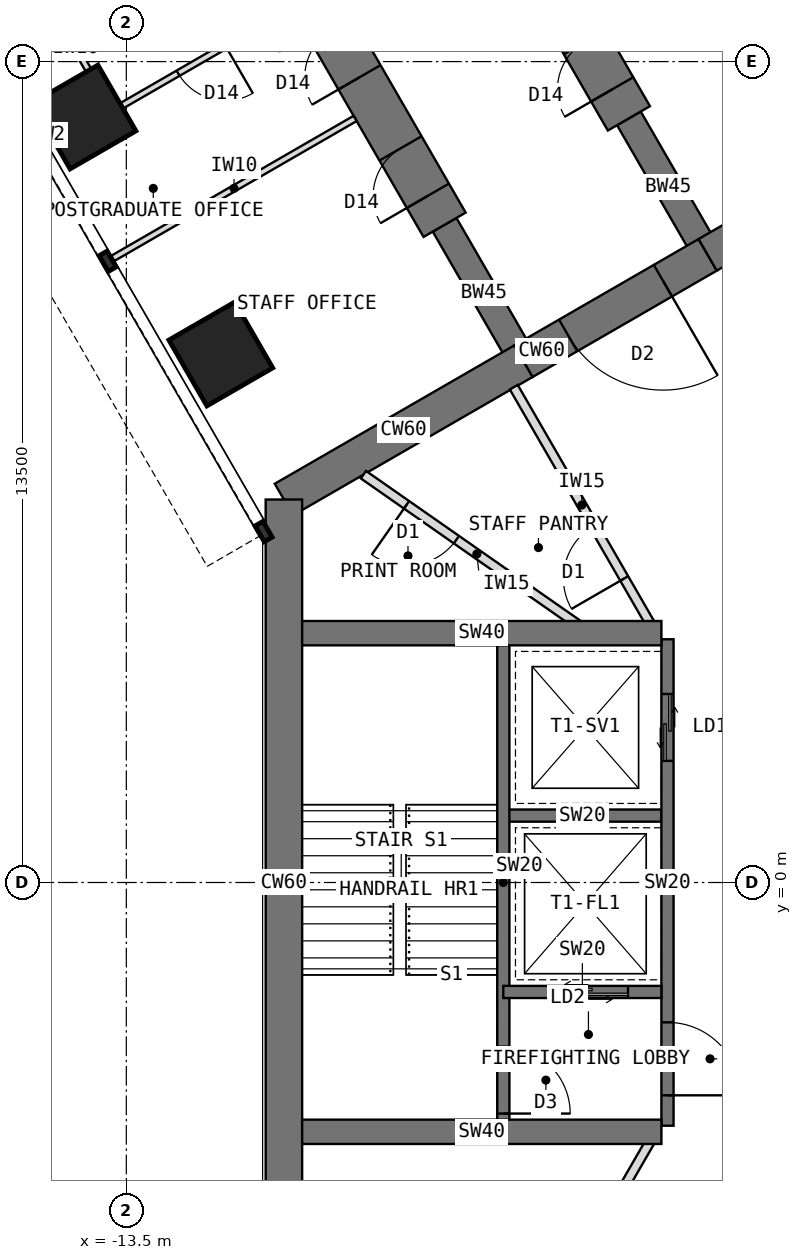
"""IFC4 building model, lengths in metres.
Left out: names, types, materials, properties, quantities, classifications, styles, units other than length and angle.
Written with IfcOpenShell. Run it as: python <this file> out.ifc"""

import sys

from ifc_helpers import new_model, si_unit, direction, frame, frame_2d, origin, origin_2d, place, context, subcontext, project, spatial, rectangle, extrude, element, fill, save


model = new_model("IFC4")
c1 = context("Model", 3, precision=1e-05, world=origin(), true_north=direction((0.0, 1.0)))
c2 = subcontext(c1, "Body", "Model", "MODEL_VIEW")
j1 = project(units=[si_unit("LENGTHUNIT", "METRE"), si_unit("PLANEANGLEUNIT", "RADIAN")], contexts=[c1])
p1 = place(None, origin())
s1 = spatial("IfcSite", under=j1, at=p1, CompositionType="ELEMENT")
p2 = place(p1, origin())
s2 = spatial("IfcBuilding", under=s1, at=p2, CompositionType="ELEMENT")
p3 = place(p2, frame((0.0, 0.0, 161.5)))
s3 = spatial("IfcBuildingStorey", under=s2, at=p3, CompositionType="ELEMENT", Elevation=161.5)
p4 = place(p3, frame((0.0, 12.596, 0.0), z_axis=(0.0, 0.0, 1.0), x_axis=(-0.866011268655, -0.500024481964, 0.0)))
e1 = element("IfcWall", 1, at=p4, inside=s3, PredefinedType="SHEAR", context=c2, shape_type="SweptSolid", body=[
    extrude(rectangle(XDim=4.548, YDim=0.6, at=frame_2d((2.274, 0.0))), origin(), (0.0, 0.0, 1.0), 4.0),
])
p5 = place(p3, frame((-3.939, 10.322, 0.0), z_axis=(0.0, 0.0, 1.0), x_axis=(-0.866019471182, -0.500010275428, 0.0)))
e2 = element("IfcWall", 2, at=p5, inside=s3, PredefinedType="SHEAR", context=c2, shape_type="SweptSolid", body=[
    extrude(rectangle(XDim=3.5, YDim=0.6, at=frame_2d((1.75, 0.0))), origin(), (0.0, 0.0, 1.0), 4.0),
])
p6 = place(p5, frame((0.85, 0.0, 0.0)))
e3 = element("IfcOpeningElement", 3, at=p6, cuts=e2, PredefinedType="OPENING", context=c2, shape_type="SweptSolid", body=[
    extrude(rectangle(XDim=1.8, YDim=2.1, at=frame_2d((0.9, 1.05))), frame((0.0, 0.31, 0.0), z_axis=(0.0, -1.0, 0.0), x_axis=(1.0, 0.0, 0.0)), (0.0, 0.0, 1.0), 0.62),
])
p7 = place(p3, frame((-6.97, 8.572, 0.0), z_axis=(0.0, 0.0, 1.0), x_axis=(-0.866034513004, -0.499984222037, 0.0)))
e4 = element("IfcWall", 4, at=p7, inside=s3, PredefinedType="SHEAR", context=c2, shape_type="SweptSolid", body=[
    extrude(rectangle(XDim=4.548, YDim=0.6, at=frame_2d((2.274, 0.0))), origin(), (0.0, 0.0, 1.0), 4.0),
])
p8 = place(p3, frame((-10.908, 6.298, 0.0), z_axis=(0.0, 0.0, 1.0), x_axis=(0.0, -1.0, 0.0)))
e5 = element("IfcWall", 5, at=p8, inside=s3, PredefinedType="SHEAR", context=c2, shape_type="SweptSolid", body=[
    extrude(rectangle(XDim=12.596, YDim=0.6, at=frame_2d((6.298, 0.0))), origin(), (0.0, 0.0, 1.0), 4.0),
])
p9 = place(p3, frame((-6.97, 8.572, 0.0), z_axis=(0.0, 0.0, 1.0), x_axis=(-0.499988811324, 0.866031863473, 0.0)))
e6 = element("IfcWall", 6, at=p9, inside=s3, PredefinedType="SHEAR", context=c2, shape_type="SweptSolid", body=[
    extrude(rectangle(XDim=2.592, YDim=0.45, at=frame_2d((1.296, 0.0))), origin(), (0.0, 0.0, 1.0), 4.0),
])
p10 = place(p3, frame((-8.266, 10.816, 0.0), z_axis=(0.0, 0.0, 1.0), x_axis=(-0.499996231654, 0.866027579429, 0.0)))
e7 = element("IfcWall", 7, at=p10, inside=s3, PredefinedType="SHEAR", context=c2, shape_type="SweptSolid", body=[
    extrude(rectangle(XDim=13.2, YDim=0.8, at=frame_2d((6.6, 0.0))), origin(), (0.0, 0.0, 1.0), 4.0),
])
p11 = place(p10, frame((0.55, 0.0, 0.0)))
e8 = element("IfcOpeningElement", 8, at=p11, cuts=e7, PredefinedType="OPENING", context=c2, shape_type="SweptSolid", body=[
    extrude(rectangle(XDim=0.9, YDim=2.1, at=frame_2d((0.45, 1.05))), frame((0.0, 0.41, 0.0), z_axis=(0.0, -1.0, 0.0), x_axis=(1.0, 0.0, 0.0)), (0.0, 0.0, 1.0), 0.82),
])
p12 = place(p10, frame((2.8, 0.0, 0.0)))
e9 = element("IfcOpeningElement", 9, at=p12, cuts=e7, PredefinedType="OPENING", context=c2, shape_type="SweptSolid", body=[
    extrude(rectangle(XDim=0.9, YDim=2.1, at=frame_2d((0.45, 1.05))), frame((0.0, 0.41, 0.0), z_axis=(0.0, -1.0, 0.0), x_axis=(1.0, 0.0, 0.0)), (0.0, 0.0, 1.0), 0.82),
])
p13 = place(p10, frame((7.3, 0.0, 0.0)))
e10 = element("IfcOpeningElement", 10, at=p13, cuts=e7, PredefinedType="OPENING", context=c2, shape_type="SweptSolid", body=[
    extrude(rectangle(XDim=0.9, YDim=2.1, at=frame_2d((0.45, 1.05))), frame((0.0, 0.41, 0.0), z_axis=(0.0, -1.0, 0.0), x_axis=(1.0, 0.0, 0.0)), (0.0, 0.0, 1.0), 0.82),
])
p14 = place(p3, frame((-3.939, 10.322, 0.0), z_axis=(0.0, 0.0, 1.0), x_axis=(-0.499918158782, 0.866072649678, 0.0)))
e11 = element("IfcWall", 11, at=p14, inside=s3, PredefinedType="SHEAR", context=c2, shape_type="SweptSolid", body=[
    extrude(rectangle(XDim=2.592, YDim=0.45, at=frame_2d((1.296, 0.0))), origin(), (0.0, 0.0, 1.0), 4.0),
])
p15 = place(p3, frame((-5.234, 12.566, 0.0), z_axis=(0.0, 0.0, 1.0), x_axis=(-0.500010103361, 0.866019570528, 0.0)))
e12 = element("IfcWall", 12, at=p15, inside=s3, PredefinedType="SHEAR", context=c2, shape_type="SweptSolid", body=[
    extrude(rectangle(XDim=13.2, YDim=0.8, at=frame_2d((6.6, 0.0))), origin(), (0.0, 0.0, 1.0), 4.0),
])
p16 = place(p15, frame((0.55, 0.0, 0.0)))
e13 = element("IfcOpeningElement", 13, at=p16, cuts=e12, PredefinedType="OPENING", context=c2, shape_type="SweptSolid", body=[
    extrude(rectangle(XDim=0.9, YDim=2.1, at=frame_2d((0.45, 1.05))), frame((0.0, 0.41, 0.0), z_axis=(0.0, -1.0, 0.0), x_axis=(1.0, 0.0, 0.0)), (0.0, 0.0, 1.0), 0.82),
])
p17 = place(p15, frame((2.8, 0.0, 0.0)))
e14 = element("IfcOpeningElement", 14, at=p17, cuts=e12, PredefinedType="OPENING", context=c2, shape_type="SweptSolid", body=[
    extrude(rectangle(XDim=0.9, YDim=2.1, at=frame_2d((0.45, 1.05))), frame((0.0, 0.41, 0.0), z_axis=(0.0, -1.0, 0.0), x_axis=(1.0, 0.0, 0.0)), (0.0, 0.0, 1.0), 0.82),
])
p18 = place(p15, frame((7.3, 0.0, 0.0)))
e15 = element("IfcOpeningElement", 15, at=p18, cuts=e12, PredefinedType="OPENING", context=c2, shape_type="SweptSolid", body=[
    extrude(rectangle(XDim=0.9, YDim=2.1, at=frame_2d((0.45, 1.05))), frame((0.0, 0.41, 0.0), z_axis=(0.0, -1.0, 0.0), x_axis=(1.0, 0.0, 0.0)), (0.0, 0.0, 1.0), 0.82),
])
for number, where, z_axis, x_axis in (
    (16, (-11.946, 8.691, 0.0), (0.0, 0.0, 1.0), (0.866, 0.5, 0.0)),
    (17, (-14.196, 12.588, 0.0), (0.0, 0.0, 1.0), (0.866, 0.5, 0.0)),
):
    element("IfcColumn", number, at=place(p3, frame(where, z_axis=z_axis, x_axis=x_axis)), inside=s3, PredefinedType="COLUMN", context=c2, shape_type="SweptSolid", body=[
        extrude(rectangle(XDim=1.25, YDim=1.25, at=origin_2d()), origin(), (0.0, 0.0, 1.0), 4.0),
    ])
p19 = place(p3, frame((-4.6, 4.0, 0.0), z_axis=(0.0, 0.0, 1.0), x_axis=(0.0, -1.0, 0.0)))
e18 = element("IfcWall", 18, at=p19, inside=s3, PredefinedType="SHEAR", context=c2, shape_type="SweptSolid", body=[
    extrude(rectangle(XDim=8.0, YDim=0.2, at=frame_2d((4.0, 0.0))), origin(), (0.0, 0.0, 1.0), 4.0),
])
p20 = place(p19, frame((6.3, 0.0, 0.0)))
e19 = element("IfcOpeningElement", 19, at=p20, cuts=e18, PredefinedType="OPENING", context=c2, shape_type="SweptSolid", body=[
    extrude(rectangle(XDim=1.2, YDim=2.1, at=frame_2d((0.6, 1.05))), frame((0.0, 0.11, 0.0), z_axis=(0.0, -1.0, 0.0), x_axis=(1.0, 0.0, 0.0)), (0.0, 0.0, 1.0), 0.22),
])
p21 = place(p19, frame((0.9, 0.0, 0.0)))
e20 = element("IfcOpeningElement", 20, at=p21, cuts=e18, PredefinedType="OPENING", context=c2, shape_type="SweptSolid", body=[
    extrude(rectangle(XDim=1.1, YDim=2.2, at=frame_2d((0.55, 1.1))), frame((0.0, 0.11, 0.0), z_axis=(0.0, -1.0, 0.0), x_axis=(1.0, 0.0, 0.0)), (0.0, 0.0, 1.0), 0.22),
])
p22 = place(p3, frame((-4.7, 1.1, 0.0), z_axis=(0.0, 0.0, 1.0), x_axis=(-1.0, 0.0, 0.0)))
e21 = element("IfcWall", 21, at=p22, inside=s3, PredefinedType="SHEAR", context=c2, shape_type="SweptSolid", body=[
    extrude(rectangle(XDim=2.6, YDim=0.2, at=frame_2d((1.3, 0.0))), origin(), (0.0, 0.0, 1.0), 4.0),
])
p23 = place(p3, frame((-4.7, -1.8, 0.0), z_axis=(0.0, 0.0, 1.0), x_axis=(-1.0, 0.0, 0.0)))
e22 = element("IfcWall", 22, at=p23, inside=s3, PredefinedType="SHEAR", context=c2, shape_type="SweptSolid", body=[
    extrude(rectangle(XDim=2.6, YDim=0.2, at=frame_2d((1.3, 0.0))), origin(), (0.0, 0.0, 1.0), 4.0),
])
p24 = place(p23, frame((0.55, 0.0, 0.0)))
e23 = element("IfcOpeningElement", 23, at=p24, cuts=e22, PredefinedType="OPENING", context=c2, shape_type="SweptSolid", body=[
    extrude(rectangle(XDim=1.3, YDim=2.2, at=frame_2d((0.65, 1.1))), frame((0.0, 0.11, 0.0), z_axis=(0.0, -1.0, 0.0), x_axis=(1.0, 0.0, 0.0)), (0.0, 0.0, 1.0), 0.22),
])
p25 = place(p3, frame((-7.3, 4.0, 0.0), z_axis=(0.0, 0.0, 1.0), x_axis=(0.0, -1.0, 0.0)))
e24 = element("IfcWall", 24, at=p25, inside=s3, PredefinedType="SHEAR", context=c2, shape_type="SweptSolid", body=[
    extrude(rectangle(XDim=8.0, YDim=0.2, at=frame_2d((4.0, 0.0))), origin(), (0.0, 0.0, 1.0), 4.0),
])
p26 = place(p25, frame((6.7, 0.0, 0.0)))
e25 = element("IfcOpeningElement", 25, at=p26, cuts=e24, PredefinedType="OPENING", context=c2, shape_type="SweptSolid", body=[
    extrude(rectangle(XDim=1.1, YDim=2.1, at=frame_2d((0.55, 1.05))), frame((0.0, 0.11, 0.0), z_axis=(0.0, -1.0, 0.0), x_axis=(1.0, 0.0, 0.0)), (0.0, 0.0, 1.0), 0.22),
])
for number, where, z_axis, x_axis in (
    (26, (-4.7, -4.1, 0.0), (0.0, 0.0, 1.0), (-1.0, 0.0, 0.0)),
    (27, (-4.7, 4.1, 0.0), (0.0, 0.0, 1.0), (-1.0, 0.0, 0.0)),
):
    element("IfcWall", number, at=place(p3, frame(where, z_axis=z_axis, x_axis=x_axis)), inside=s3, PredefinedType="SHEAR", context=c2, shape_type="SweptSolid", body=[
        extrude(rectangle(XDim=5.908, YDim=0.4, at=frame_2d((2.954, 0.0))), origin(), (0.0, 0.0, 1.0), 4.0),
    ])
p27 = place(p3, frame((-9.737, 12.565, 0.0), z_axis=(0.0, 0.0, 1.0), x_axis=(-0.866016770315, -0.500014953309, 0.0)))
e28 = element("IfcWall", 28, at=p27, inside=s3, PredefinedType="PARTITIONING", context=c2, shape_type="SweptSolid", body=[
    extrude(rectangle(XDim=4.6, YDim=0.1, at=frame_2d((2.3, 0.0))), origin(), (0.0, 0.0, 1.0), 3.7),
])
p28 = place(p3, frame((-13.731, 12.684, 0.0), z_axis=(0.0, 0.0, 1.0), x_axis=(-0.500001309137, 0.866024647952, 0.0)))
e29 = element("IfcWall", 29, at=p28, inside=s3, PredefinedType="PARTITIONING", context=c2, shape_type="SweptSolid", body=[
    extrude(rectangle(XDim=2.4, YDim=0.1, at=frame_2d((1.2, 0.0))), origin(), (0.0, 0.0, 1.0), 3.7),
])
p29 = place(p3, frame((-10.787, 14.384, 0.0), z_axis=(0.0, 0.0, 1.0), x_axis=(-0.866038511948, -0.499977295307, 0.0)))
e30 = element("IfcWall", 30, at=p29, inside=s3, PredefinedType="PARTITIONING", context=c2, shape_type="SweptSolid", body=[
    extrude(rectangle(XDim=3.4, YDim=0.1, at=frame_2d((1.7, 0.0))), origin(), (0.0, 0.0, 1.0), 3.7),
])
p30 = place(p29, frame((1.25, 0.0, 0.0)))
e31 = element("IfcOpeningElement", 31, at=p30, cuts=e30, PredefinedType="OPENING", context=c2, shape_type="SweptSolid", body=[
    extrude(rectangle(XDim=0.9, YDim=2.1, at=frame_2d((0.45, 1.05))), frame((0.0, 0.06, 0.0), z_axis=(0.0, -1.0, 0.0), x_axis=(1.0, 0.0, 0.0)), (0.0, 0.0, 1.0), 0.12),
])
p31 = place(p3, frame((-7.128, -8.146, 0.0), z_axis=(0.0, 0.0, 1.0), x_axis=(0.499999473313, 0.866025707867, 0.0)))
e32 = element("IfcWall", 32, at=p31, inside=s3, PredefinedType="PARTITIONING", context=c2, shape_type="SweptSolid", body=[
    extrude(rectangle(XDim=4.476, YDim=0.15, at=frame_2d((2.238, 0.0))), origin(), (0.0, 0.0, 1.0), 3.7),
])
p32 = place(p31, frame((0.843, 0.0, 0.0)))
e33 = element("IfcOpeningElement", 33, at=p32, cuts=e32, PredefinedType="OPENING", context=c2, shape_type="SweptSolid", body=[
    extrude(rectangle(XDim=1.0, YDim=2.1, at=frame_2d((0.5, 1.05))), frame((0.0, 0.085, 0.0), z_axis=(0.0, -1.0, 0.0), x_axis=(1.0, 0.0, 0.0)), (0.0, 0.0, 1.0), 0.17),
])
p33 = place(p3, frame((-4.89, 4.27, 0.0), z_axis=(0.0, 0.0, 1.0), x_axis=(-0.499999473313, 0.866025707867, 0.0)))
e34 = element("IfcWall", 34, at=p33, inside=s3, PredefinedType="PARTITIONING", context=c2, shape_type="SweptSolid", body=[
    extrude(rectangle(XDim=4.476, YDim=0.15, at=frame_2d((2.238, 0.0))), origin(), (0.0, 0.0, 1.0), 3.7),
])
p34 = place(p33, frame((0.843, 0.0, 0.0)))
e35 = element("IfcOpeningElement", 35, at=p34, cuts=e34, PredefinedType="OPENING", context=c2, shape_type="SweptSolid", body=[
    extrude(rectangle(XDim=1.0, YDim=2.1, at=frame_2d((0.5, 1.05))), frame((0.0, 0.085, 0.0), z_axis=(0.0, -1.0, 0.0), x_axis=(1.0, 0.0, 0.0)), (0.0, 0.0, 1.0), 0.17),
])
p35 = place(p3, frame((-5.869, 4.1, 0.0), z_axis=(0.0, 0.0, 1.0), x_axis=(-0.819788459852, 0.572666465836, 0.0)))
e36 = element("IfcWall", 36, at=p35, inside=s3, PredefinedType="PARTITIONING", context=c2, shape_type="SweptSolid", body=[
    extrude(rectangle(XDim=4.552, YDim=0.15, at=frame_2d((2.276, 0.0))), origin(), (0.0, 0.0, 1.0), 3.7),
])
p36 = place(p35, frame((2.686, 0.0, 0.0)))
e37 = element("IfcOpeningElement", 37, at=p36, cuts=e36, PredefinedType="OPENING", context=c2, shape_type="SweptSolid", body=[
    extrude(rectangle(XDim=1.0, YDim=2.1, at=frame_2d((0.5, 1.05))), frame((0.0, 0.085, 0.0), z_axis=(0.0, -1.0, 0.0), x_axis=(1.0, 0.0, 0.0)), (0.0, 0.0, 1.0), 0.17),
])
p37 = place(p20, origin())
e38 = element("IfcDoor", 38, at=p37, inside=s3, OperationType="SINGLE_SWING_RIGHT", PredefinedType="DOOR", context=c2, shape_type="SweptSolid", body=[
    extrude(rectangle(XDim=1.2, YDim=2.1, at=frame_2d((0.6, 1.05))), frame((0.0, 0.025, 0.0), z_axis=(0.0, -1.0, 0.0), x_axis=(1.0, 0.0, 0.0)), (0.0, 0.0, 1.0), 0.05),
])
fill(e19, e38)
p38 = place(p24, origin())
e39 = element("IfcDoor", 39, at=p38, inside=s3, OperationType="DOUBLE_DOOR_SLIDING", PredefinedType="DOOR", context=c2, shape_type="SweptSolid", body=[
    extrude(rectangle(XDim=1.3, YDim=2.2, at=frame_2d((0.65, 1.1))), frame((0.0, 0.025, 0.0), z_axis=(0.0, -1.0, 0.0), x_axis=(1.0, 0.0, 0.0)), (0.0, 0.0, 1.0), 0.05),
])
fill(e23, e39)
p39 = place(p21, origin())
e40 = element("IfcDoor", 40, at=p39, inside=s3, OperationType="DOUBLE_DOOR_SLIDING", PredefinedType="DOOR", context=c2, shape_type="SweptSolid", body=[
    extrude(rectangle(XDim=1.1, YDim=2.2, at=frame_2d((0.55, 1.1))), frame((0.0, 0.025, 0.0), z_axis=(0.0, -1.0, 0.0), x_axis=(1.0, 0.0, 0.0)), (0.0, 0.0, 1.0), 0.05),
])
fill(e20, e40)
p40 = place(p26, origin())
e41 = element("IfcDoor", 41, at=p40, inside=s3, OperationType="SINGLE_SWING_RIGHT", PredefinedType="DOOR", context=c2, shape_type="SweptSolid", body=[
    extrude(rectangle(XDim=1.1, YDim=2.1, at=frame_2d((0.55, 1.05))), frame((0.0, 0.025, 0.0), z_axis=(0.0, -1.0, 0.0), x_axis=(1.0, 0.0, 0.0)), (0.0, 0.0, 1.0), 0.05),
])
fill(e25, e41)
p41 = place(p6, origin())
e42 = element("IfcDoor", 42, at=p41, inside=s3, OperationType="DOUBLE_DOOR_DOUBLE_SWING", PredefinedType="DOOR", context=c2, shape_type="SweptSolid", body=[
    extrude(rectangle(XDim=1.72, YDim=2.06, at=frame_2d((0.9, 1.03))), frame((0.0, 0.025, 0.0), z_axis=(0.0, -1.0, 0.0), x_axis=(1.0, 0.0, 0.0)), (0.0, 0.0, 1.0), 0.05),
    extrude(rectangle(XDim=0.04, YDim=2.1, at=frame_2d((0.02, 1.05))), frame((0.0, 0.3, 0.0), z_axis=(0.0, -1.0, 0.0), x_axis=(1.0, 0.0, 0.0)), (0.0, 0.0, 1.0), 0.6),
    extrude(rectangle(XDim=0.04, YDim=2.1, at=frame_2d((1.78, 1.05))), frame((0.0, 0.3, 0.0), z_axis=(0.0, -1.0, 0.0), x_axis=(1.0, 0.0, 0.0)), (0.0, 0.0, 1.0), 0.6),
    extrude(rectangle(XDim=1.72, YDim=0.04, at=frame_2d((0.9, 2.08))), frame((0.0, 0.3, 0.0), z_axis=(0.0, -1.0, 0.0), x_axis=(1.0, 0.0, 0.0)), (0.0, 0.0, 1.0), 0.6),
])
fill(e3, e42)
p42 = place(p30, origin())
e43 = element("IfcDoor", 43, at=p42, inside=s3, OperationType="SINGLE_SWING_LEFT", PredefinedType="DOOR", context=c2, shape_type="SweptSolid", body=[
    extrude(rectangle(XDim=0.9, YDim=2.1, at=frame_2d((0.45, 1.05))), frame((0.0, 0.025, 0.0), z_axis=(0.0, -1.0, 0.0), x_axis=(1.0, 0.0, 0.0)), (0.0, 0.0, 1.0), 0.05),
])
fill(e31, e43)
p43 = place(p36, origin())
e44 = element("IfcDoor", 44, at=p43, inside=s3, OperationType="SINGLE_SWING_RIGHT", PredefinedType="DOOR", context=c2, shape_type="SweptSolid", body=[
    extrude(rectangle(XDim=1.0, YDim=2.1, at=frame_2d((0.5, 1.05))), frame((0.0, 0.025, 0.0), z_axis=(0.0, -1.0, 0.0), x_axis=(1.0, 0.0, 0.0)), (0.0, 0.0, 1.0), 0.05),
])
fill(e37, e44)
p44 = place(p34, origin())
e45 = element("IfcDoor", 45, at=p44, inside=s3, OperationType="SINGLE_SWING_LEFT", PredefinedType="DOOR", context=c2, shape_type="SweptSolid", body=[
    extrude(rectangle(XDim=1.0, YDim=2.1, at=frame_2d((0.5, 1.05))), frame((0.0, 0.025, 0.0), z_axis=(0.0, -1.0, 0.0), x_axis=(1.0, 0.0, 0.0)), (0.0, 0.0, 1.0), 0.05),
])
fill(e35, e45)
p45 = place(p11, origin())
e46 = element("IfcDoor", 46, at=p45, inside=s3, OperationType="SINGLE_SWING_LEFT", PredefinedType="DOOR", context=c2, shape_type="SweptSolid", body=[
    extrude(rectangle(XDim=0.82, YDim=2.06, at=frame_2d((0.45, 1.03))), frame((0.0, 0.025, 0.0), z_axis=(0.0, -1.0, 0.0), x_axis=(1.0, 0.0, 0.0)), (0.0, 0.0, 1.0), 0.05),
    extrude(rectangle(XDim=0.04, YDim=2.1, at=frame_2d((0.02, 1.05))), frame((0.0, 0.4, 0.0), z_axis=(0.0, -1.0, 0.0), x_axis=(1.0, 0.0, 0.0)), (0.0, 0.0, 1.0), 0.8),
    extrude(rectangle(XDim=0.04, YDim=2.1, at=frame_2d((0.88, 1.05))), frame((0.0, 0.4, 0.0), z_axis=(0.0, -1.0, 0.0), x_axis=(1.0, 0.0, 0.0)), (0.0, 0.0, 1.0), 0.8),
    extrude(rectangle(XDim=0.82, YDim=0.04, at=frame_2d((0.45, 2.08))), frame((0.0, 0.4, 0.0), z_axis=(0.0, -1.0, 0.0), x_axis=(1.0, 0.0, 0.0)), (0.0, 0.0, 1.0), 0.8),
])
fill(e8, e46)
p46 = place(p12, origin())
e47 = element("IfcDoor", 47, at=p46, inside=s3, OperationType="SINGLE_SWING_LEFT", PredefinedType="DOOR", context=c2, shape_type="SweptSolid", body=[
    extrude(rectangle(XDim=0.82, YDim=2.06, at=frame_2d((0.45, 1.03))), frame((0.0, 0.025, 0.0), z_axis=(0.0, -1.0, 0.0), x_axis=(1.0, 0.0, 0.0)), (0.0, 0.0, 1.0), 0.05),
    extrude(rectangle(XDim=0.04, YDim=2.1, at=frame_2d((0.02, 1.05))), frame((0.0, 0.4, 0.0), z_axis=(0.0, -1.0, 0.0), x_axis=(1.0, 0.0, 0.0)), (0.0, 0.0, 1.0), 0.8),
    extrude(rectangle(XDim=0.04, YDim=2.1, at=frame_2d((0.88, 1.05))), frame((0.0, 0.4, 0.0), z_axis=(0.0, -1.0, 0.0), x_axis=(1.0, 0.0, 0.0)), (0.0, 0.0, 1.0), 0.8),
    extrude(rectangle(XDim=0.82, YDim=0.04, at=frame_2d((0.45, 2.08))), frame((0.0, 0.4, 0.0), z_axis=(0.0, -1.0, 0.0), x_axis=(1.0, 0.0, 0.0)), (0.0, 0.0, 1.0), 0.8),
])
fill(e9, e47)
p47 = place(p16, origin())
e48 = element("IfcDoor", 48, at=p47, inside=s3, OperationType="SINGLE_SWING_LEFT", PredefinedType="DOOR", context=c2, shape_type="SweptSolid", body=[
    extrude(rectangle(XDim=0.82, YDim=2.06, at=frame_2d((0.45, 1.03))), frame((0.0, 0.025, 0.0), z_axis=(0.0, -1.0, 0.0), x_axis=(1.0, 0.0, 0.0)), (0.0, 0.0, 1.0), 0.05),
    extrude(rectangle(XDim=0.04, YDim=2.1, at=frame_2d((0.02, 1.05))), frame((0.0, 0.4, 0.0), z_axis=(0.0, -1.0, 0.0), x_axis=(1.0, 0.0, 0.0)), (0.0, 0.0, 1.0), 0.8),
    extrude(rectangle(XDim=0.04, YDim=2.1, at=frame_2d((0.88, 1.05))), frame((0.0, 0.4, 0.0), z_axis=(0.0, -1.0, 0.0), x_axis=(1.0, 0.0, 0.0)), (0.0, 0.0, 1.0), 0.8),
    extrude(rectangle(XDim=0.82, YDim=0.04, at=frame_2d((0.45, 2.08))), frame((0.0, 0.4, 0.0), z_axis=(0.0, -1.0, 0.0), x_axis=(1.0, 0.0, 0.0)), (0.0, 0.0, 1.0), 0.8),
])
fill(e13, e48)
save(model, sys.argv[1])
